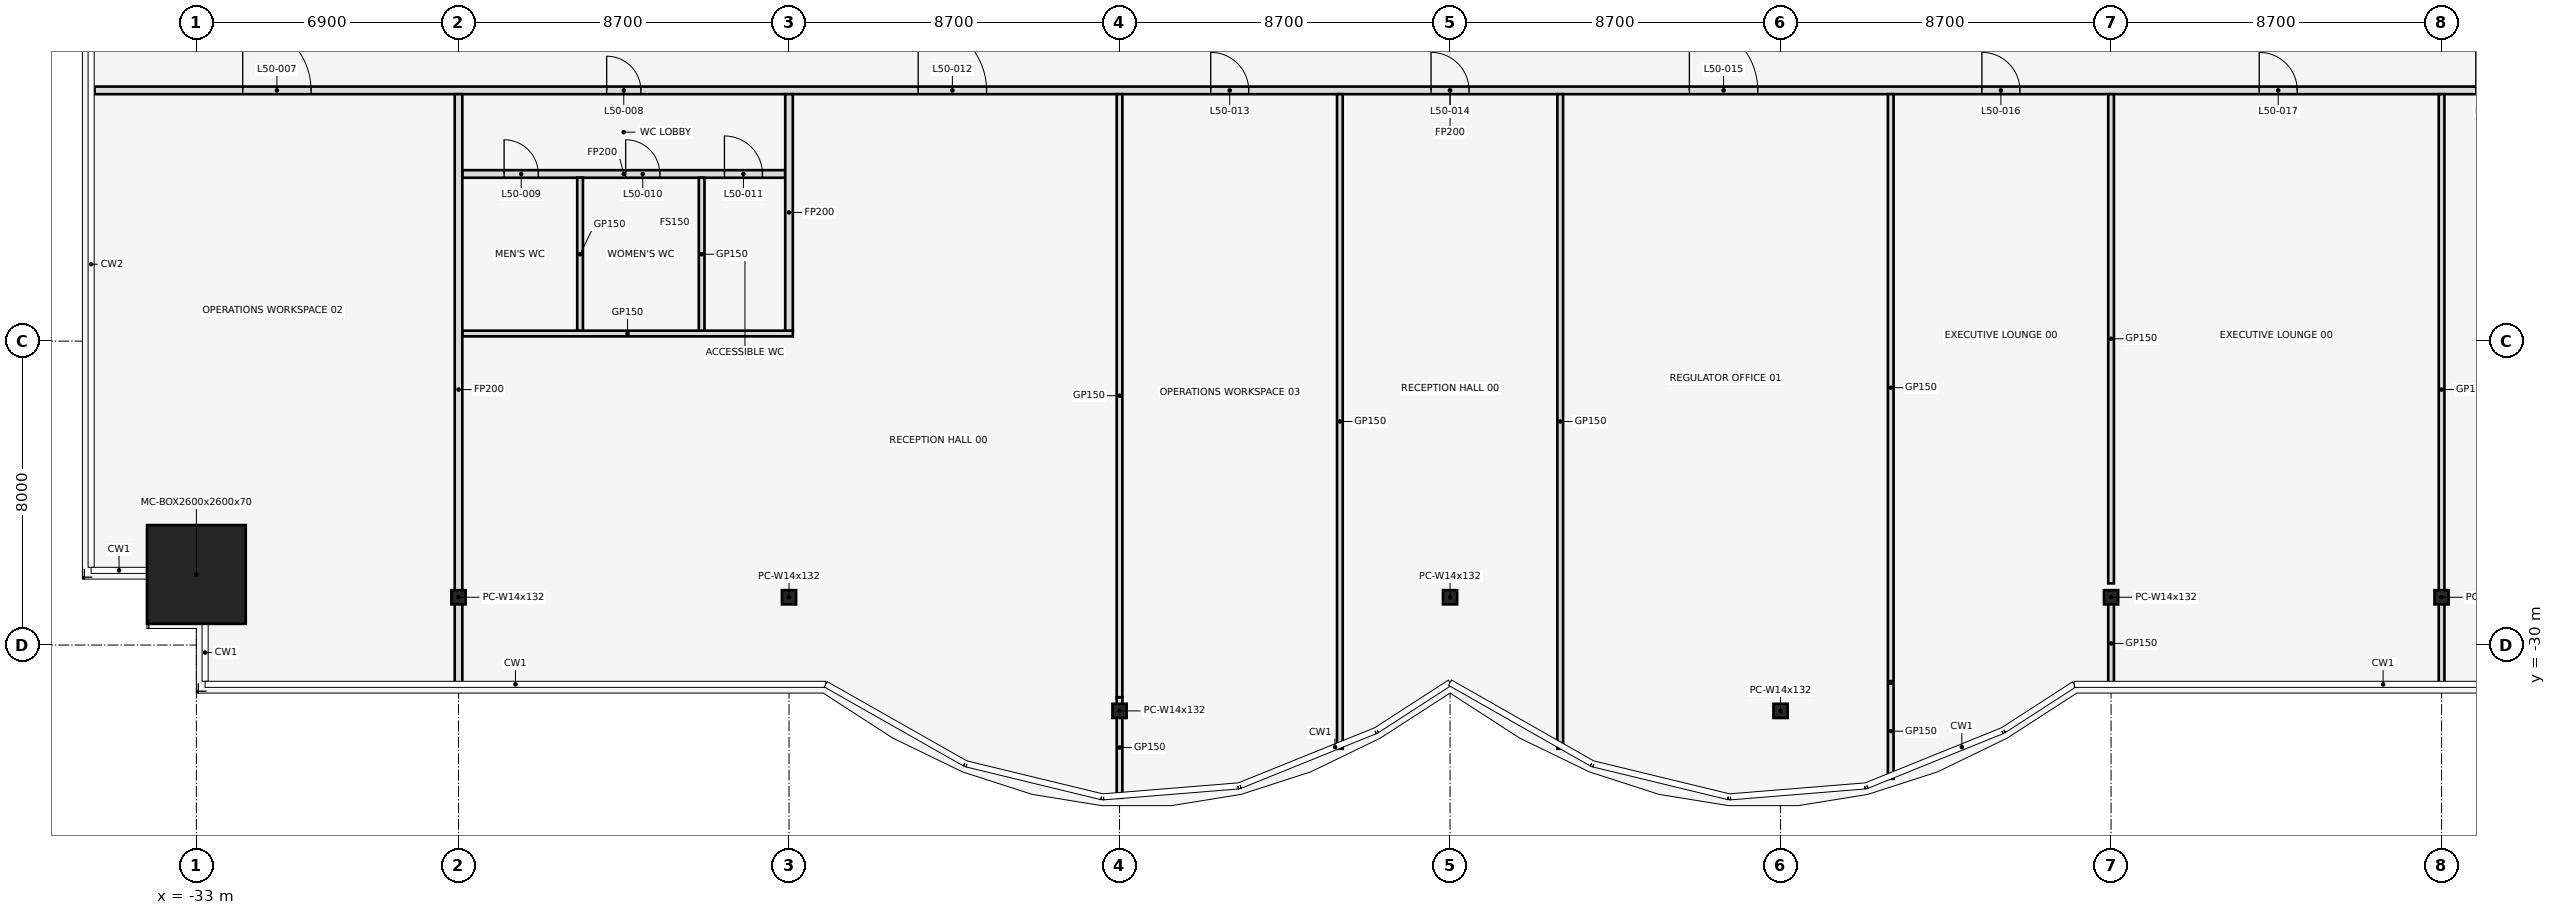
"""IFC4 building model, lengths in metres.
Left out: names, types, materials, properties, quantities, classifications, styles, units other than length and angle.
Written with IfcOpenShell. Run it as: python <this file> out.ifc"""

import sys

from ifc_helpers import new_model, si_unit, direction, frame, frame_2d, origin, origin_2d, place, context, subcontext, project, spatial, rectangle, hollow_rectangle, i_section, extrude, element, fill, save


model = new_model("IFC4")
c1 = context("Model", 3, precision=1e-05, world=origin(), true_north=direction((0.0, 1.0)))
c2 = subcontext(c1, "Body", "Model", "MODEL_VIEW")
j1 = project(units=[si_unit("LENGTHUNIT", "METRE"), si_unit("PLANEANGLEUNIT", "RADIAN")], contexts=[c1])
p1 = place(None, origin())
s1 = spatial("IfcSite", under=j1, at=p1, CompositionType="ELEMENT")
p2 = place(p1, origin())
s2 = spatial("IfcBuilding", under=s1, at=p2, CompositionType="ELEMENT")
p3 = place(p2, frame((0.0, 0.0, 223.7)))
s3 = spatial("IfcBuildingStorey", under=s2, at=p3, CompositionType="ELEMENT", Elevation=223.7)
p4 = place(p3, frame((-33.0, -28.142, 0.0), z_axis=(0.0, 0.0, 1.0), x_axis=(1.0, 0.0, 0.0)))
e1 = element("IfcColumn", 1, at=p4, inside=s3, PredefinedType="COLUMN", context=c2, shape_type="SweptSolid", body=[
    extrude(hollow_rectangle(XDim=2.6, YDim=2.6, WallThickness=0.07, at=origin_2d()), origin(), (0.0, 0.0, 1.0), 4.1),
])
for number, where, z_axis, x_axis in (
    (2, (-26.1, -28.742, 0.0), (0.0, 0.0, 1.0), (1.0, 0.0, 0.0)),
    (3, (-17.4, -28.742, 0.0), (0.0, 0.0, 1.0), (1.0, 0.0, 0.0)),
    (4, (-8.7, -31.733, 0.0), (0.0, 0.0, 1.0), (1.0, 0.0, 0.0)),
    (5, (0.0, -28.742, 0.0), (0.0, 0.0, 1.0), (1.0, 0.0, 0.0)),
    (6, (8.7, -31.733, 0.0), (0.0, 0.0, 1.0), (1.0, 0.0, 0.0)),
    (7, (17.4, -28.742, 0.0), (0.0, 0.0, 1.0), (1.0, 0.0, 0.0)),
    (8, (26.1, -28.742, 0.0), (0.0, 0.0, 1.0), (1.0, 0.0, 0.0)),
):
    element("IfcColumn", number, at=place(p3, frame(where, z_axis=z_axis, x_axis=x_axis)), inside=s3, PredefinedType="COLUMN", context=c2, shape_type="SweptSolid", body=[
        extrude(i_section(OverallWidth=0.373, OverallDepth=0.373, WebThickness=0.016, FlangeThickness=0.026, at=origin_2d()), origin(), (0.0, 0.0, 1.0), 4.1),
    ])
p5 = place(p3, frame((-26.0, -21.8, 0.0), z_axis=(0.0, 0.0, 1.0), x_axis=(1.0, 0.0, 0.0)))
e9 = element("IfcWall", 9, at=p5, inside=s3, PredefinedType="PARTITIONING", context=c2, shape_type="SweptSolid", body=[
    extrude(rectangle(XDim=8.7, YDim=0.15, at=frame_2d((4.35, 0.0))), origin(), (0.0, 0.0, 1.0), 2.84),
])
p6 = place(p3, frame((-26.0, -17.6, 0.0), z_axis=(0.0, 0.0, 1.0), x_axis=(1.0, 0.0, 0.0)))
e10 = element("IfcWall", 10, at=p6, inside=s3, PredefinedType="PARTITIONING", context=c2, shape_type="SweptSolid", body=[
    extrude(rectangle(XDim=8.5, YDim=0.2, at=frame_2d((4.25, 0.0))), origin(), (0.0, 0.0, 1.0), 2.84),
])
p7 = place(p6, frame((1.1, 0.0, 0.0)))
e11 = element("IfcOpeningElement", 11, at=p7, cuts=e10, PredefinedType="OPENING", context=c2, shape_type="SweptSolid", body=[
    extrude(rectangle(XDim=0.9, YDim=2.1, at=frame_2d((0.45, 1.05))), frame((0.0, 0.112, 0.0), z_axis=(0.0, -1.0, 0.0), x_axis=(1.0, 0.0, 0.0)), (0.0, 0.0, 1.0), 0.224),
])
p8 = place(p6, frame((4.3, 0.0, 0.0)))
e12 = element("IfcOpeningElement", 12, at=p8, cuts=e10, PredefinedType="OPENING", context=c2, shape_type="SweptSolid", body=[
    extrude(rectangle(XDim=0.9, YDim=2.1, at=frame_2d((0.45, 1.05))), frame((0.0, 0.112, 0.0), z_axis=(0.0, -1.0, 0.0), x_axis=(1.0, 0.0, 0.0)), (0.0, 0.0, 1.0), 0.224),
])
p9 = place(p6, frame((6.9, 0.0, 0.0)))
e13 = element("IfcOpeningElement", 13, at=p9, cuts=e10, PredefinedType="OPENING", context=c2, shape_type="SweptSolid", body=[
    extrude(rectangle(XDim=1.0, YDim=2.1, at=frame_2d((0.5, 1.05))), frame((0.0, 0.112, 0.0), z_axis=(0.0, -1.0, 0.0), x_axis=(1.0, 0.0, 0.0)), (0.0, 0.0, 1.0), 0.224),
])
p10 = place(p3, frame((-35.68, -15.4, 0.0), z_axis=(0.0, 0.0, 1.0), x_axis=(1.0, 0.0, 0.0)))
e14 = element("IfcWall", 14, at=p10, inside=s3, PredefinedType="PARTITIONING", context=c2, shape_type="SweptSolid", body=[
    extrude(rectangle(XDim=71.36, YDim=0.2, at=frame_2d((35.68, 0.0))), origin(), (0.0, 0.0, 1.0), 2.84),
])
p11 = place(p10, frame((3.9, 0.0, 0.0)))
e15 = element("IfcOpeningElement", 15, at=p11, cuts=e14, PredefinedType="OPENING", context=c2, shape_type="SweptSolid", body=[
    extrude(rectangle(XDim=1.8, YDim=2.1, at=frame_2d((0.9, 1.05))), frame((0.0, 0.112, 0.0), z_axis=(0.0, -1.0, 0.0), x_axis=(1.0, 0.0, 0.0)), (0.0, 0.0, 1.0), 0.224),
])
p12 = place(p10, frame((13.48, 0.0, 0.0)))
e16 = element("IfcOpeningElement", 16, at=p12, cuts=e14, PredefinedType="OPENING", context=c2, shape_type="SweptSolid", body=[
    extrude(rectangle(XDim=0.9, YDim=2.1, at=frame_2d((0.45, 1.05))), frame((0.0, 0.112, 0.0), z_axis=(0.0, -1.0, 0.0), x_axis=(1.0, 0.0, 0.0)), (0.0, 0.0, 1.0), 0.224),
])
p13 = place(p10, frame((21.68, 0.0, 0.0)))
e17 = element("IfcOpeningElement", 17, at=p13, cuts=e14, PredefinedType="OPENING", context=c2, shape_type="SweptSolid", body=[
    extrude(rectangle(XDim=1.8, YDim=2.1, at=frame_2d((0.9, 1.05))), frame((0.0, 0.112, 0.0), z_axis=(0.0, -1.0, 0.0), x_axis=(1.0, 0.0, 0.0)), (0.0, 0.0, 1.0), 0.224),
])
p14 = place(p10, frame((29.38, 0.0, 0.0)))
e18 = element("IfcOpeningElement", 18, at=p14, cuts=e14, PredefinedType="OPENING", context=c2, shape_type="SweptSolid", body=[
    extrude(rectangle(XDim=1.0, YDim=2.1, at=frame_2d((0.5, 1.05))), frame((0.0, 0.112, 0.0), z_axis=(0.0, -1.0, 0.0), x_axis=(1.0, 0.0, 0.0)), (0.0, 0.0, 1.0), 0.224),
])
p15 = place(p10, frame((35.18, 0.0, 0.0)))
e19 = element("IfcOpeningElement", 19, at=p15, cuts=e14, PredefinedType="OPENING", context=c2, shape_type="SweptSolid", body=[
    extrude(rectangle(XDim=1.0, YDim=2.1, at=frame_2d((0.5, 1.05))), frame((0.0, 0.112, 0.0), z_axis=(0.0, -1.0, 0.0), x_axis=(1.0, 0.0, 0.0)), (0.0, 0.0, 1.0), 0.224),
])
p16 = place(p10, frame((41.98, 0.0, 0.0)))
e20 = element("IfcOpeningElement", 20, at=p16, cuts=e14, PredefinedType="OPENING", context=c2, shape_type="SweptSolid", body=[
    extrude(rectangle(XDim=1.8, YDim=2.1, at=frame_2d((0.9, 1.05))), frame((0.0, 0.112, 0.0), z_axis=(0.0, -1.0, 0.0), x_axis=(1.0, 0.0, 0.0)), (0.0, 0.0, 1.0), 0.224),
])
p17 = place(p10, frame((49.68, 0.0, 0.0)))
e21 = element("IfcOpeningElement", 21, at=p17, cuts=e14, PredefinedType="OPENING", context=c2, shape_type="SweptSolid", body=[
    extrude(rectangle(XDim=1.0, YDim=2.1, at=frame_2d((0.5, 1.05))), frame((0.0, 0.112, 0.0), z_axis=(0.0, -1.0, 0.0), x_axis=(1.0, 0.0, 0.0)), (0.0, 0.0, 1.0), 0.224),
])
p18 = place(p10, frame((56.98, 0.0, 0.0)))
e22 = element("IfcOpeningElement", 22, at=p18, cuts=e14, PredefinedType="OPENING", context=c2, shape_type="SweptSolid", body=[
    extrude(rectangle(XDim=1.0, YDim=2.1, at=frame_2d((0.5, 1.05))), frame((0.0, 0.112, 0.0), z_axis=(0.0, -1.0, 0.0), x_axis=(1.0, 0.0, 0.0)), (0.0, 0.0, 1.0), 0.224),
])
p19 = place(p10, frame((62.68, 0.0, 0.0)))
e23 = element("IfcOpeningElement", 23, at=p19, cuts=e14, PredefinedType="OPENING", context=c2, shape_type="SweptSolid", body=[
    extrude(rectangle(XDim=1.0, YDim=2.1, at=frame_2d((0.5, 1.05))), frame((0.0, 0.112, 0.0), z_axis=(0.0, -1.0, 0.0), x_axis=(1.0, 0.0, 0.0)), (0.0, 0.0, 1.0), 0.224),
])
p20 = place(p10, frame((67.48, 0.0, 0.0)))
e24 = element("IfcOpeningElement", 24, at=p20, cuts=e14, PredefinedType="OPENING", context=c2, shape_type="SweptSolid", body=[
    extrude(rectangle(XDim=1.0, YDim=2.1, at=frame_2d((0.5, 1.05))), frame((0.0, 0.112, 0.0), z_axis=(0.0, -1.0, 0.0), x_axis=(1.0, 0.0, 0.0)), (0.0, 0.0, 1.0), 0.224),
])
p21 = place(p3, frame((-26.1, -31.05, 0.0), z_axis=(0.0, 0.0, 1.0), x_axis=(0.0, 1.0, 0.0)))
e25 = element("IfcWall", 25, at=p21, inside=s3, PredefinedType="PARTITIONING", context=c2, shape_type="SweptSolid", body=[
    extrude(rectangle(XDim=15.55, YDim=0.2, at=frame_2d((7.775, 0.0))), origin(), (0.0, 0.0, 1.0), 2.84),
])
for number, where, z_axis, x_axis in (
    (26, (-22.9, -21.725, 0.0), (0.0, 0.0, 1.0), (0.0, 1.0, 0.0)),
    (27, (-19.7, -21.725, 0.0), (0.0, 0.0, 1.0), (0.0, 1.0, 0.0)),
):
    element("IfcWall", number, at=place(p3, frame(where, z_axis=z_axis, x_axis=x_axis)), inside=s3, PredefinedType="PARTITIONING", context=c2, shape_type="SweptSolid", body=[
        extrude(rectangle(XDim=4.025, YDim=0.15, at=frame_2d((2.013, 0.0))), origin(), (0.0, 0.0, 1.0), 2.84),
    ])
p22 = place(p3, frame((-17.4, -21.725, 0.0), z_axis=(0.0, 0.0, 1.0), x_axis=(0.0, 1.0, 0.0)))
e28 = element("IfcWall", 28, at=p22, inside=s3, PredefinedType="PARTITIONING", context=c2, shape_type="SweptSolid", body=[
    extrude(rectangle(XDim=6.225, YDim=0.2, at=frame_2d((3.113, 0.0))), origin(), (0.0, 0.0, 1.0), 2.84),
])
p23 = place(p3, frame((-8.7, -34.02, 0.0), z_axis=(0.0, 0.0, 1.0), x_axis=(0.0, 1.0, 0.0)))
e29 = element("IfcWall", 29, at=p23, inside=s3, PredefinedType="PARTITIONING", context=c2, shape_type="SweptSolid", body=[
    extrude(rectangle(XDim=2.646, YDim=0.15, at=frame_2d((1.323, 0.0))), origin(), (0.0, 0.0, 1.0), 2.84),
])
p24 = place(p3, frame((-8.7, -31.374, 0.0), z_axis=(0.0, 0.0, 1.0), x_axis=(0.0, 1.0, 0.0)))
e30 = element("IfcWall", 30, at=p24, inside=s3, PredefinedType="PARTITIONING", context=c2, shape_type="SweptSolid", body=[
    extrude(rectangle(XDim=15.874, YDim=0.15, at=frame_2d((7.937, 0.0))), origin(), (0.0, 0.0, 1.0), 2.84),
])
for number, where, z_axis, x_axis in (
    (31, (-2.9, -32.73, 0.0), (0.0, 0.0, 1.0), (0.0, 1.0, 0.0)),
    (32, (2.9, -32.73, 0.0), (0.0, 0.0, 1.0), (0.0, 1.0, 0.0)),
):
    element("IfcWall", number, at=place(p3, frame(where, z_axis=z_axis, x_axis=x_axis)), inside=s3, PredefinedType="PARTITIONING", context=c2, shape_type="SweptSolid", body=[
        extrude(rectangle(XDim=17.23, YDim=0.15, at=frame_2d((8.615, 0.0))), origin(), (0.0, 0.0, 1.0), 2.84),
    ])
p25 = place(p3, frame((11.6, -33.52, 0.0), z_axis=(0.0, 0.0, 1.0), x_axis=(0.0, 1.0, 0.0)))
e33 = element("IfcWall", 33, at=p25, inside=s3, PredefinedType="PARTITIONING", context=c2, shape_type="SweptSolid", body=[
    extrude(rectangle(XDim=2.506, YDim=0.15, at=frame_2d((1.253, 0.0))), origin(), (0.0, 0.0, 1.0), 2.84),
])
p26 = place(p3, frame((11.6, -30.951, 0.0), z_axis=(0.0, 0.0, 1.0), x_axis=(0.0, 1.0, 0.0)))
e34 = element("IfcWall", 34, at=p26, inside=s3, PredefinedType="PARTITIONING", context=c2, shape_type="SweptSolid", body=[
    extrude(rectangle(XDim=15.451, YDim=0.15, at=frame_2d((7.726, 0.0))), origin(), (0.0, 0.0, 1.0), 2.84),
])
p27 = place(p3, frame((17.4, -31.05, 0.0), z_axis=(0.0, 0.0, 1.0), x_axis=(0.0, 1.0, 0.0)))
e35 = element("IfcWall", 35, at=p27, inside=s3, PredefinedType="PARTITIONING", context=c2, shape_type="SweptSolid", body=[
    extrude(rectangle(XDim=2.186, YDim=0.15, at=frame_2d((1.093, 0.0))), origin(), (0.0, 0.0, 1.0), 2.84),
])
p28 = place(p3, frame((17.4, -28.376, 0.0), z_axis=(0.0, 0.0, 1.0), x_axis=(0.0, 1.0, 0.0)))
e36 = element("IfcWall", 36, at=p28, inside=s3, PredefinedType="PARTITIONING", context=c2, shape_type="SweptSolid", body=[
    extrude(rectangle(XDim=12.876, YDim=0.15, at=frame_2d((6.438, 0.0))), origin(), (0.0, 0.0, 1.0), 2.84),
])
p29 = place(p3, frame((26.1, -31.05, 0.0), z_axis=(0.0, 0.0, 1.0), x_axis=(0.0, 1.0, 0.0)))
e37 = element("IfcWall", 37, at=p29, inside=s3, PredefinedType="PARTITIONING", context=c2, shape_type="SweptSolid", body=[
    extrude(rectangle(XDim=15.55, YDim=0.15, at=frame_2d((7.775, 0.0))), origin(), (0.0, 0.0, 1.0), 2.84),
])
p30 = place(p11, origin())
e38 = element("IfcDoor", 38, at=p30, inside=s3, OperationType="SINGLE_SWING_LEFT", PredefinedType="DOOR", context=c2, shape_type="SweptSolid", body=[
    extrude(rectangle(XDim=1.8, YDim=2.1, at=frame_2d((0.9, 1.05))), frame((0.0, 0.025, 0.0), z_axis=(0.0, -1.0, 0.0), x_axis=(1.0, 0.0, 0.0)), (0.0, 0.0, 1.0), 0.05),
])
fill(e15, e38)
p31 = place(p12, frame((0.9, 0.0, 0.0), z_axis=(0.0, 0.0, 1.0), x_axis=(-1.0, 0.0, 0.0)))
e39 = element("IfcDoor", 39, at=p31, inside=s3, OperationType="SINGLE_SWING_RIGHT", PredefinedType="DOOR", context=c2, shape_type="SweptSolid", body=[
    extrude(rectangle(XDim=0.9, YDim=2.1, at=frame_2d((0.45, 1.05))), frame((0.0, 0.025, 0.0), z_axis=(0.0, -1.0, 0.0), x_axis=(1.0, 0.0, 0.0)), (0.0, 0.0, 1.0), 0.05),
])
fill(e16, e39)
p32 = place(p7, frame((0.9, 0.0, 0.0), z_axis=(0.0, 0.0, 1.0), x_axis=(-1.0, 0.0, 0.0)))
e40 = element("IfcDoor", 40, at=p32, inside=s3, OperationType="SINGLE_SWING_RIGHT", PredefinedType="DOOR", context=c2, shape_type="SweptSolid", body=[
    extrude(rectangle(XDim=0.9, YDim=2.1, at=frame_2d((0.45, 1.05))), frame((0.0, 0.025, 0.0), z_axis=(0.0, -1.0, 0.0), x_axis=(1.0, 0.0, 0.0)), (0.0, 0.0, 1.0), 0.05),
])
fill(e11, e40)
p33 = place(p8, frame((0.9, 0.0, 0.0), z_axis=(0.0, 0.0, 1.0), x_axis=(-1.0, 0.0, 0.0)))
e41 = element("IfcDoor", 41, at=p33, inside=s3, OperationType="SINGLE_SWING_LEFT", PredefinedType="DOOR", context=c2, shape_type="SweptSolid", body=[
    extrude(rectangle(XDim=0.9, YDim=2.1, at=frame_2d((0.45, 1.05))), frame((0.0, 0.025, 0.0), z_axis=(0.0, -1.0, 0.0), x_axis=(1.0, 0.0, 0.0)), (0.0, 0.0, 1.0), 0.05),
])
fill(e12, e41)
p34 = place(p9, frame((1.0, 0.0, 0.0), z_axis=(0.0, 0.0, 1.0), x_axis=(-1.0, 0.0, 0.0)))
e42 = element("IfcDoor", 42, at=p34, inside=s3, OperationType="SINGLE_SWING_RIGHT", PredefinedType="DOOR", context=c2, shape_type="SweptSolid", body=[
    extrude(rectangle(XDim=1.0, YDim=2.1, at=frame_2d((0.5, 1.05))), frame((0.0, 0.025, 0.0), z_axis=(0.0, -1.0, 0.0), x_axis=(1.0, 0.0, 0.0)), (0.0, 0.0, 1.0), 0.05),
])
fill(e13, e42)
p35 = place(p13, origin())
e43 = element("IfcDoor", 43, at=p35, inside=s3, OperationType="SINGLE_SWING_LEFT", PredefinedType="DOOR", context=c2, shape_type="SweptSolid", body=[
    extrude(rectangle(XDim=1.8, YDim=2.1, at=frame_2d((0.9, 1.05))), frame((0.0, 0.025, 0.0), z_axis=(0.0, -1.0, 0.0), x_axis=(1.0, 0.0, 0.0)), (0.0, 0.0, 1.0), 0.05),
])
fill(e17, e43)
p36 = place(p14, frame((1.0, 0.0, 0.0), z_axis=(0.0, 0.0, 1.0), x_axis=(-1.0, 0.0, 0.0)))
e44 = element("IfcDoor", 44, at=p36, inside=s3, OperationType="SINGLE_SWING_LEFT", PredefinedType="DOOR", context=c2, shape_type="SweptSolid", body=[
    extrude(rectangle(XDim=1.0, YDim=2.1, at=frame_2d((0.5, 1.05))), frame((0.0, 0.025, 0.0), z_axis=(0.0, -1.0, 0.0), x_axis=(1.0, 0.0, 0.0)), (0.0, 0.0, 1.0), 0.05),
])
fill(e18, e44)
p37 = place(p15, frame((1.0, 0.0, 0.0), z_axis=(0.0, 0.0, 1.0), x_axis=(-1.0, 0.0, 0.0)))
e45 = element("IfcDoor", 45, at=p37, inside=s3, OperationType="SINGLE_SWING_RIGHT", PredefinedType="DOOR", context=c2, shape_type="SweptSolid", body=[
    extrude(rectangle(XDim=1.0, YDim=2.1, at=frame_2d((0.5, 1.05))), frame((0.0, 0.025, 0.0), z_axis=(0.0, -1.0, 0.0), x_axis=(1.0, 0.0, 0.0)), (0.0, 0.0, 1.0), 0.05),
])
fill(e19, e45)
p38 = place(p16, origin())
e46 = element("IfcDoor", 46, at=p38, inside=s3, OperationType="SINGLE_SWING_LEFT", PredefinedType="DOOR", context=c2, shape_type="SweptSolid", body=[
    extrude(rectangle(XDim=1.8, YDim=2.1, at=frame_2d((0.9, 1.05))), frame((0.0, 0.025, 0.0), z_axis=(0.0, -1.0, 0.0), x_axis=(1.0, 0.0, 0.0)), (0.0, 0.0, 1.0), 0.05),
])
fill(e20, e46)
p39 = place(p17, frame((1.0, 0.0, 0.0), z_axis=(0.0, 0.0, 1.0), x_axis=(-1.0, 0.0, 0.0)))
e47 = element("IfcDoor", 47, at=p39, inside=s3, OperationType="SINGLE_SWING_LEFT", PredefinedType="DOOR", context=c2, shape_type="SweptSolid", body=[
    extrude(rectangle(XDim=1.0, YDim=2.1, at=frame_2d((0.5, 1.05))), frame((0.0, 0.025, 0.0), z_axis=(0.0, -1.0, 0.0), x_axis=(1.0, 0.0, 0.0)), (0.0, 0.0, 1.0), 0.05),
])
fill(e21, e47)
p40 = place(p18, frame((1.0, 0.0, 0.0), z_axis=(0.0, 0.0, 1.0), x_axis=(-1.0, 0.0, 0.0)))
e48 = element("IfcDoor", 48, at=p40, inside=s3, OperationType="SINGLE_SWING_RIGHT", PredefinedType="DOOR", context=c2, shape_type="SweptSolid", body=[
    extrude(rectangle(XDim=1.0, YDim=2.1, at=frame_2d((0.5, 1.05))), frame((0.0, 0.025, 0.0), z_axis=(0.0, -1.0, 0.0), x_axis=(1.0, 0.0, 0.0)), (0.0, 0.0, 1.0), 0.05),
])
fill(e22, e48)
p41 = place(p19, frame((1.0, 0.0, 0.0), z_axis=(0.0, 0.0, 1.0), x_axis=(-1.0, 0.0, 0.0)))
e49 = element("IfcDoor", 49, at=p41, inside=s3, OperationType="SINGLE_SWING_RIGHT", PredefinedType="DOOR", context=c2, shape_type="SweptSolid", body=[
    extrude(rectangle(XDim=1.0, YDim=2.1, at=frame_2d((0.5, 1.05))), frame((0.0, 0.025, 0.0), z_axis=(0.0, -1.0, 0.0), x_axis=(1.0, 0.0, 0.0)), (0.0, 0.0, 1.0), 0.05),
])
fill(e23, e49)
save(model, sys.argv[1])
